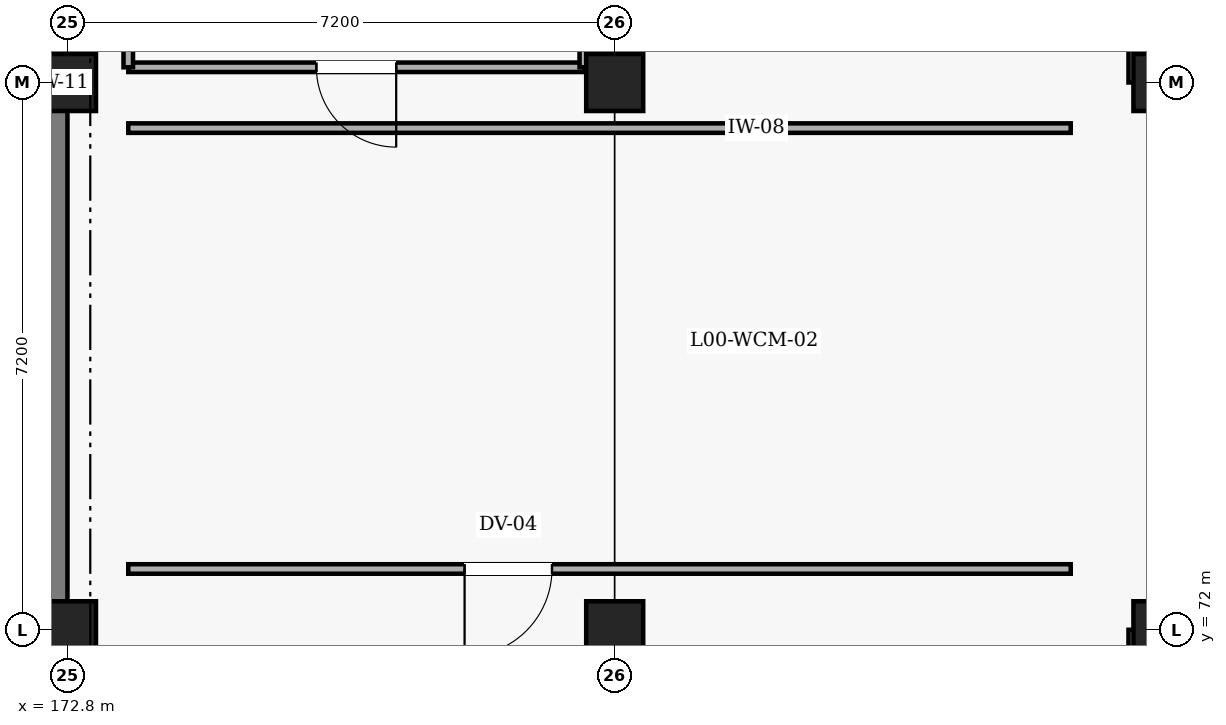
"""IFC4 building model, lengths in metres.
Left out: names, types, materials, properties, quantities, classifications, styles, units other than length and angle.
Written with IfcOpenShell. Run it as: python <this file> out.ifc"""

import sys

from ifc_helpers import new_model, si_unit, direction, frame, frame_2d, origin, origin_2d, place, context, subcontext, project, spatial, rectangle, extrude, element, fill, save


model = new_model("IFC4")
c1 = context("Model", 3, precision=1e-05, world=origin(), true_north=direction((0.0, 1.0)))
c2 = subcontext(c1, "Body", "Model", "MODEL_VIEW")
j1 = project(units=[si_unit("LENGTHUNIT", "METRE"), si_unit("PLANEANGLEUNIT", "RADIAN")], contexts=[c1])
p1 = place(None, origin())
s1 = spatial("IfcSite", under=j1, at=p1, CompositionType="ELEMENT")
p2 = place(p1, origin())
s2 = spatial("IfcBuilding", under=s1, at=p2, CompositionType="ELEMENT")
p3 = place(p2, origin())
s3 = spatial("IfcBuildingStorey", under=s2, at=p3, CompositionType="ELEMENT", Elevation=0.0)
p4 = place(p3, frame((172.665, 86.13, 0.0), z_axis=(0.0, 0.0, 1.0), x_axis=(0.0, -1.0, 0.0)))
e1 = element("IfcWall", 1, at=p4, inside=s3, PredefinedType="SHEAR", context=c2, shape_type="SweptSolid", body=[
    extrude(rectangle(XDim=13.86, YDim=0.27, at=frame_2d((6.93, 0.0))), origin(), (0.0, 0.0, 1.0), 5.4),
])
p5 = place(p3, frame((172.8, 72.135, 0.0), z_axis=(0.0, 0.0, 1.0), x_axis=(-1.0, 0.0, 0.0)))
e2 = element("IfcWall", 2, at=p5, inside=s3, PredefinedType="SHEAR", context=c2, shape_type="SweptSolid", body=[
    extrude(rectangle(XDim=7.2, YDim=0.27, at=frame_2d((3.6, 0.0))), origin(), (0.0, 0.0, 1.0), 5.4),
])
for number, where, z_axis, x_axis in (
    (3, (172.8, 72.0, 0.0), (0.0, 0.0, 1.0), (1.0, 0.0, 0.0)),
    (4, (172.8, 79.2, 0.0), (0.0, 0.0, 1.0), (1.0, 0.0, 0.0)),
    (5, (180.0, 72.0, 0.0), (0.0, 0.0, 1.0), (1.0, 0.0, 0.0)),
    (6, (180.0, 79.2, 0.0), (0.0, 0.0, 1.0), (1.0, 0.0, 0.0)),
    (7, (187.2, 72.0, 0.0), (0.0, 0.0, 1.0), (1.0, 0.0, 0.0)),
    (8, (187.2, 79.2, 0.0), (0.0, 0.0, 1.0), (1.0, 0.0, 0.0)),
):
    element("IfcColumn", number, at=place(p3, frame(where, z_axis=z_axis, x_axis=x_axis)), inside=s3, PredefinedType="COLUMN", context=c2, shape_type="SweptSolid", body=[
        extrude(rectangle(XDim=0.75, YDim=0.75, at=origin_2d()), origin(), (0.0, 0.0, 1.0), 5.1),
    ])
p6 = place(p3, frame((186.98, 86.4, 0.0), z_axis=(0.0, 0.0, 1.0), x_axis=(0.0, -1.0, 0.0)))
e9 = element("IfcWall", 9, at=p6, inside=s3, PredefinedType="SOLIDWALL", context=c2, shape_type="SweptSolid", body=[
    extrude(rectangle(XDim=7.2, YDim=0.44, at=frame_2d((3.6, 0.0))), origin(), (0.0, 0.0, 1.0), 4.77),
])
p7 = place(p6, frame((2.425, 0.0, 0.9)))
e10 = element("IfcOpeningElement", 10, at=p7, cuts=e9, PredefinedType="OPENING", context=c2, shape_type="SweptSolid", body=[
    extrude(rectangle(XDim=2.35, YDim=1.5, at=frame_2d((1.175, 0.75))), frame((0.0, 0.23, 0.0), z_axis=(0.0, -1.0, 0.0), x_axis=(1.0, 0.0, 0.0)), (0.0, 0.0, 1.0), 0.46),
])
p8 = place(p3, frame((186.98, 72.0, 0.0), z_axis=(0.0, 0.0, 1.0), x_axis=(0.0, -1.0, 0.0)))
e11 = element("IfcWall", 11, at=p8, inside=s3, PredefinedType="SOLIDWALL", context=c2, shape_type="SweptSolid", body=[
    extrude(rectangle(XDim=7.2, YDim=0.44, at=frame_2d((3.6, 0.0))), origin(), (0.0, 0.0, 1.0), 4.77),
])
p9 = place(p8, frame((2.375, 0.0, 0.9)))
e12 = element("IfcOpeningElement", 12, at=p9, cuts=e11, PredefinedType="OPENING", context=c2, shape_type="SweptSolid", body=[
    extrude(rectangle(XDim=2.45, YDim=1.55, at=frame_2d((1.225, 0.775))), frame((0.0, 0.23, 0.0), z_axis=(0.0, -1.0, 0.0), x_axis=(1.0, 0.0, 0.0)), (0.0, 0.0, 1.0), 0.46),
])
p10 = place(p3, frame((173.6, 78.6, 0.0), z_axis=(0.0, 0.0, 1.0), x_axis=(1.0, 0.0, 0.0)))
e13 = element("IfcWall", 13, at=p10, inside=s3, PredefinedType="PARTITIONING", context=c2, shape_type="SweptSolid", body=[
    extrude(rectangle(XDim=12.4, YDim=0.125, at=frame_2d((6.2, 0.0))), origin(), (0.0, 0.0, 1.0), 4.7),
])
p11 = place(p3, frame((186.0, 72.8, 0.0), z_axis=(0.0, 0.0, 1.0), x_axis=(-1.0, 0.0, 0.0)))
e14 = element("IfcWall", 14, at=p11, inside=s3, PredefinedType="PARTITIONING", context=c2, shape_type="SweptSolid", body=[
    extrude(rectangle(XDim=12.4, YDim=0.125, at=frame_2d((6.2, 0.0))), origin(), (0.0, 0.0, 1.0), 4.7),
])
p12 = place(p11, frame((6.825, 0.0, 0.0)))
e15 = element("IfcOpeningElement", 15, at=p12, cuts=e14, PredefinedType="OPENING", context=c2, shape_type="SweptSolid", body=[
    extrude(rectangle(XDim=1.15, YDim=2.2, at=frame_2d((0.575, 1.1))), frame((0.0, 0.073, 0.0), z_axis=(0.0, -1.0, 0.0), x_axis=(1.0, 0.0, 0.0)), (0.0, 0.0, 1.0), 0.145),
])
p13 = place(p3, frame((179.6, 79.4, 0.0), z_axis=(0.0, 0.0, 1.0), x_axis=(-1.0, 0.0, 0.0)))
e16 = element("IfcWall", 16, at=p13, inside=s3, PredefinedType="PARTITIONING", context=c2, shape_type="SweptSolid", body=[
    extrude(rectangle(XDim=6.0, YDim=0.125, at=frame_2d((3.0, 0.0))), origin(), (0.0, 0.0, 1.0), 4.6),
])
p14 = place(p13, frame((2.475, 0.0, 0.0)))
e17 = element("IfcOpeningElement", 17, at=p14, cuts=e16, PredefinedType="OPENING", context=c2, shape_type="SweptSolid", body=[
    extrude(rectangle(XDim=1.05, YDim=2.1, at=frame_2d((0.525, 1.05))), frame((0.0, 0.073, 0.0), z_axis=(0.0, -1.0, 0.0), x_axis=(1.0, 0.0, 0.0)), (0.0, 0.0, 1.0), 0.145),
])
for number, where, z_axis, x_axis in (
    (18, (179.6, 84.2, 0.0), (0.0, 0.0, 1.0), (0.0, -1.0, 0.0)),
    (19, (173.6, 79.4, 0.0), (0.0, 0.0, 1.0), (0.0, 1.0, 0.0)),
):
    element("IfcWall", number, at=place(p3, frame(where, z_axis=z_axis, x_axis=x_axis)), inside=s3, PredefinedType="PARTITIONING", context=c2, shape_type="SweptSolid", body=[
        extrude(rectangle(XDim=4.8, YDim=0.125, at=frame_2d((2.4, 0.0))), origin(), (0.0, 0.0, 1.0), 4.77),
    ])
p15 = place(p12, origin())
e20 = element("IfcDoor", 20, at=p15, inside=s3, OperationType="SINGLE_SWING_RIGHT", PredefinedType="DOOR", context=c2, shape_type="SweptSolid", body=[
    extrude(rectangle(XDim=1.15, YDim=2.2, at=frame_2d((0.575, 1.1))), frame((0.0, 0.025, 0.0), z_axis=(0.0, -1.0, 0.0), x_axis=(1.0, 0.0, 0.0)), (0.0, 0.0, 1.0), 0.05),
])
fill(e15, e20)
p16 = place(p14, origin())
e21 = element("IfcDoor", 21, at=p16, inside=s3, OperationType="SINGLE_SWING_LEFT", PredefinedType="DOOR", context=c2, shape_type="SweptSolid", body=[
    extrude(rectangle(XDim=1.05, YDim=2.1, at=frame_2d((0.525, 1.05))), frame((0.0, 0.025, 0.0), z_axis=(0.0, -1.0, 0.0), x_axis=(1.0, 0.0, 0.0)), (0.0, 0.0, 1.0), 0.05),
])
fill(e17, e21)
save(model, sys.argv[1])
